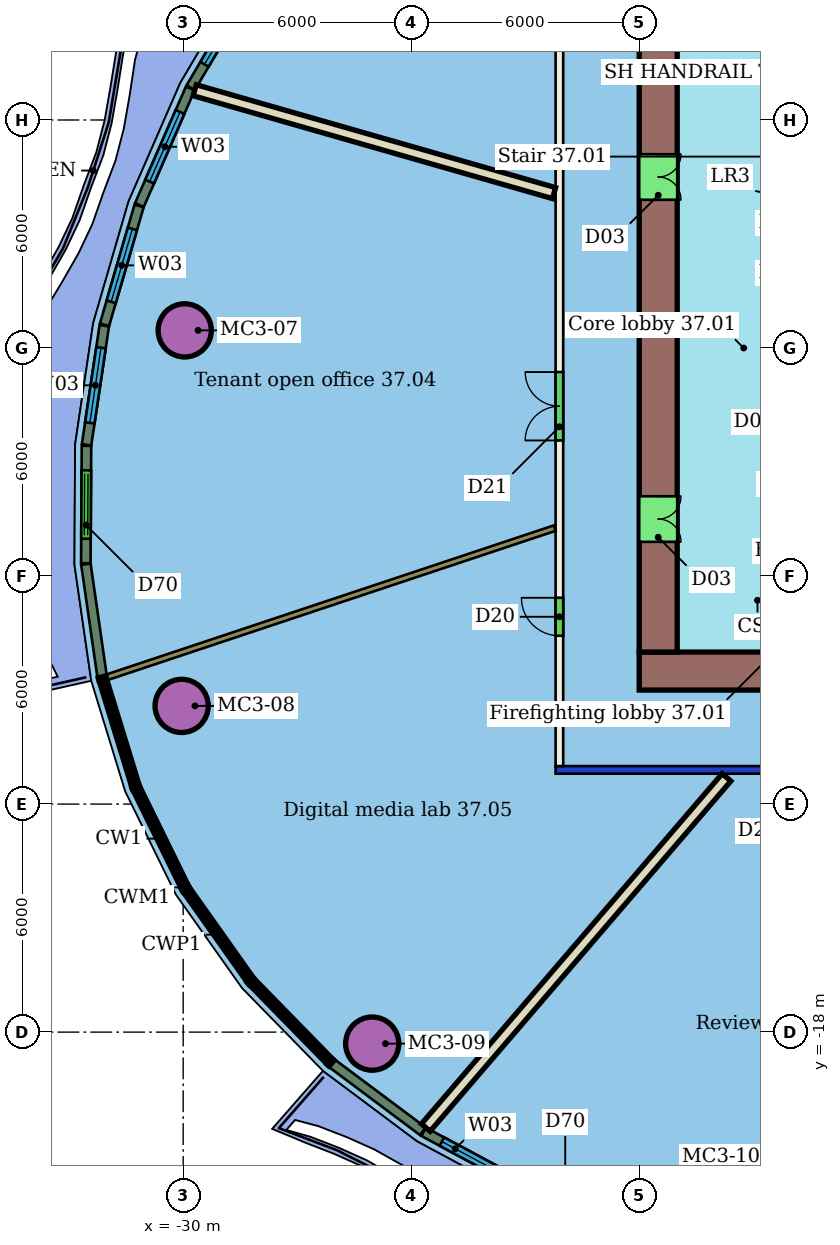
"""IFC4 building model, lengths in metres.
Left out: names, types, materials, properties, quantities, classifications, styles, units other than length and angle.
Written with IfcOpenShell. Run it as: python <this file> out.ifc"""

import sys

from ifc_helpers import new_model, si_unit, direction, frame, frame_2d, origin, origin_2d, place, context, subcontext, project, spatial, rectangle, hollow_circle, extrude, element, fill, save


model = new_model("IFC4")
c1 = context("Model", 3, precision=1e-05, world=origin(), true_north=direction((0.0, 1.0)))
c2 = subcontext(c1, "Body", "Model", "MODEL_VIEW")
j1 = project(units=[si_unit("LENGTHUNIT", "METRE"), si_unit("PLANEANGLEUNIT", "RADIAN")], contexts=[c1])
p1 = place(None, origin())
s1 = spatial("IfcSite", under=j1, at=p1, CompositionType="ELEMENT")
p2 = place(p1, origin())
s2 = spatial("IfcBuilding", under=s1, at=p2, CompositionType="ELEMENT")
p3 = place(p2, frame((0.0, 0.0, 157.8)))
s3 = spatial("IfcBuildingStorey", under=s2, at=p3, CompositionType="ELEMENT", Elevation=157.8)
for number, where, z_axis, x_axis in (
    (1, (-29.959, 0.464, 0.0), (0.0, 0.0, 1.0), (1.0, 0.0, 0.0)),
    (2, (-30.041, -9.417, 0.0), (0.0, 0.0, 1.0), (1.0, 0.0, 0.0)),
    (3, (-25.026, -18.303, 0.0), (0.0, 0.0, 1.0), (1.0, 0.0, 0.0)),
):
    element("IfcColumn", number, at=place(p3, frame(where, z_axis=z_axis, x_axis=x_axis)), inside=s3, PredefinedType="COLUMN", context=c2, shape_type="SweptSolid", body=[
        extrude(hollow_circle(Radius=0.7, WallThickness=0.05, at=origin_2d()), origin(), (0.0, 0.0, 1.0), 3.45),
    ])
p4 = place(p3, frame((8.2, -11.1, 0.0), z_axis=(0.0, 0.0, 1.0), x_axis=(-1.0, 0.0, 0.0)))
e4 = element("IfcWall", 4, at=p4, inside=s3, PredefinedType="PARTITIONING", context=c2, shape_type="SweptSolid", body=[
    extrude(rectangle(XDim=28.4, YDim=0.2, at=frame_2d((14.2, 0.0))), origin(), (0.0, 0.0, 1.0), 3.05),
])
p5 = place(p4, frame((19.745, 0.0, 0.0)))
e5 = element("IfcOpeningElement", 5, at=p5, cuts=e4, PredefinedType="OPENING", context=c2, shape_type="SweptSolid", body=[
    extrude(rectangle(XDim=1.8, YDim=2.4, at=frame_2d((0.9, 1.2))), frame((0.0, 0.11, 0.0), z_axis=(0.0, -1.0, 0.0), x_axis=(1.0, 0.0, 0.0)), (0.0, 0.0, 1.0), 0.22),
])
p6 = place(p4, frame((7.756, 0.0, 0.0)))
e6 = element("IfcOpeningElement", 6, at=p6, cuts=e4, PredefinedType="OPENING", context=c2, shape_type="SweptSolid", body=[
    extrude(rectangle(XDim=1.2, YDim=2.1, at=frame_2d((0.6, 1.05))), frame((0.0, 0.11, 0.0), z_axis=(0.0, -1.0, 0.0), x_axis=(1.0, 0.0, 0.0)), (0.0, 0.0, 1.0), 0.22),
])
p7 = place(p3, frame((-20.1, -11.0, 0.0), z_axis=(0.0, 0.0, 1.0), x_axis=(0.0, 1.0, 0.0)))
e7 = element("IfcWall", 7, at=p7, inside=s3, PredefinedType="PARTITIONING", context=c2, shape_type="SweptSolid", body=[
    extrude(rectangle(XDim=22.0, YDim=0.2, at=frame_2d((11.0, 0.0))), origin(), (0.0, 0.0, 1.0), 3.45),
])
p8 = place(p7, frame((8.568, 0.0, 0.0)))
e8 = element("IfcOpeningElement", 8, at=p8, cuts=e7, PredefinedType="OPENING", context=c2, shape_type="SweptSolid", body=[
    extrude(rectangle(XDim=1.8, YDim=2.1, at=frame_2d((0.9, 1.05))), frame((0.0, 0.11, 0.0), z_axis=(0.0, -1.0, 0.0), x_axis=(1.0, 0.0, 0.0)), (0.0, 0.0, 1.0), 0.22),
])
p9 = place(p7, frame((3.429, 0.0, 0.0)))
e9 = element("IfcOpeningElement", 9, at=p9, cuts=e7, PredefinedType="OPENING", context=c2, shape_type="SweptSolid", body=[
    extrude(rectangle(XDim=1.0, YDim=2.1, at=frame_2d((0.5, 1.05))), frame((0.0, 0.11, 0.0), z_axis=(0.0, -1.0, 0.0), x_axis=(1.0, 0.0, 0.0)), (0.0, 0.0, 1.0), 0.22),
])
p10 = place(p3, frame((-29.697, 6.783, 0.0), z_axis=(0.0, 0.0, 1.0), x_axis=(0.961388014147, -0.275196450295, 0.0)))
e10 = element("IfcWall", 10, at=p10, inside=s3, PredefinedType="PARTITIONING", context=c2, shape_type="SweptSolid", body=[
    extrude(rectangle(XDim=9.836, YDim=0.3, at=frame_2d((4.918, 0.0))), origin(), (0.0, 0.0, 1.0), 3.45),
])
p11 = place(p3, frame((-32.005, -8.663, 0.0), z_axis=(0.0, 0.0, 1.0), x_axis=(0.948742264592, 0.316050811384, 0.0)))
e11 = element("IfcWall", 11, at=p11, inside=s3, PredefinedType="PARTITIONING", context=c2, shape_type="SweptSolid", body=[
    extrude(rectangle(XDim=12.417, YDim=0.15, at=frame_2d((6.209, 0.0))), origin(), (0.0, 0.0, 1.0), 3.45),
])
p12 = place(p3, frame((-23.616, -20.511, 0.0), z_axis=(0.0, 0.0, 1.0), x_axis=(0.65154594092, 0.758609179268, 0.0)))
e12 = element("IfcWall", 12, at=p12, inside=s3, PredefinedType="PARTITIONING", context=c2, shape_type="SweptSolid", body=[
    extrude(rectangle(XDim=12.145, YDim=0.3, at=frame_2d((6.073, 0.0))), origin(), (0.0, 0.0, 1.0), 3.45),
])
p13 = place(p3, frame((-28.057, 9.804, 0.0), z_axis=(0.0, 0.0, 1.0), x_axis=(-0.508707735762, -0.860939277519, 0.0)))
e13 = element("IfcWall", 13, at=p13, inside=s3, PredefinedType="SOLIDWALL", context=c2, shape_type="SweptSolid", body=[
    extrude(rectangle(XDim=3.431, YDim=0.25, at=frame_2d((1.715, 0.0))), origin(), (0.0, 0.0, 1.0), 3.1),
])
p14 = place(p13, frame((0.716, 0.0, 0.9)))
e14 = element("IfcOpeningElement", 14, at=p14, cuts=e13, PredefinedType="OPENING", context=c2, shape_type="SweptSolid", body=[
    extrude(rectangle(XDim=2.0, YDim=2.1, at=frame_2d((1.0, 1.05))), frame((0.0, 0.135, 0.0), z_axis=(0.0, -1.0, 0.0), x_axis=(1.0, 0.0, 0.0)), (0.0, 0.0, 1.0), 0.27),
])
p15 = place(p3, frame((-29.813, 6.83, 0.0), z_axis=(0.0, 0.0, 1.0), x_axis=(-0.399984559648, -0.916521877559, 0.0)))
e15 = element("IfcWall", 15, at=p15, inside=s3, PredefinedType="SOLIDWALL", context=c2, shape_type="SweptSolid", body=[
    extrude(rectangle(XDim=3.347, YDim=0.25, at=frame_2d((1.674, 0.0))), origin(), (0.0, 0.0, 1.0), 3.1),
])
p16 = place(p15, frame((0.674, 0.0, 0.9)))
e16 = element("IfcOpeningElement", 16, at=p16, cuts=e15, PredefinedType="OPENING", context=c2, shape_type="SweptSolid", body=[
    extrude(rectangle(XDim=2.0, YDim=2.1, at=frame_2d((1.0, 1.05))), frame((0.0, 0.135, 0.0), z_axis=(0.0, -1.0, 0.0), x_axis=(1.0, 0.0, 0.0)), (0.0, 0.0, 1.0), 0.27),
])
p17 = place(p3, frame((-31.16, 3.739, 0.0), z_axis=(0.0, 0.0, 1.0), x_axis=(-0.279349638575, -0.960189449759, 0.0)))
e17 = element("IfcWall", 17, at=p17, inside=s3, PredefinedType="SOLIDWALL", context=c2, shape_type="SweptSolid", body=[
    extrude(rectangle(XDim=3.258, YDim=0.25, at=frame_2d((1.629, 0.0))), origin(), (0.0, 0.0, 1.0), 3.1),
])
p18 = place(p17, frame((0.629, 0.0, 0.9)))
e18 = element("IfcOpeningElement", 18, at=p18, cuts=e17, PredefinedType="OPENING", context=c2, shape_type="SweptSolid", body=[
    extrude(rectangle(XDim=2.0, YDim=2.1, at=frame_2d((1.0, 1.05))), frame((0.0, 0.135, 0.0), z_axis=(0.0, -1.0, 0.0), x_axis=(1.0, 0.0, 0.0)), (0.0, 0.0, 1.0), 0.27),
])
p19 = place(p3, frame((-32.076, 0.586, 0.0), z_axis=(0.0, 0.0, 1.0), x_axis=(-0.147361008263, -0.989082773707, 0.0)))
e19 = element("IfcWall", 19, at=p19, inside=s3, PredefinedType="SOLIDWALL", context=c2, shape_type="SweptSolid", body=[
    extrude(rectangle(XDim=3.169, YDim=0.25, at=frame_2d((1.585, 0.0))), origin(), (0.0, 0.0, 1.0), 3.1),
])
p20 = place(p19, frame((0.585, 0.0, 0.9)))
e20 = element("IfcOpeningElement", 20, at=p20, cuts=e19, PredefinedType="OPENING", context=c2, shape_type="SweptSolid", body=[
    extrude(rectangle(XDim=2.0, YDim=2.1, at=frame_2d((1.0, 1.05))), frame((0.0, 0.135, 0.0), z_axis=(0.0, -1.0, 0.0), x_axis=(1.0, 0.0, 0.0)), (0.0, 0.0, 1.0), 0.27),
])
p21 = place(p3, frame((-32.545, -2.574, 0.0), z_axis=(0.0, 0.0, 1.0), x_axis=(-0.005534387094, -0.999984685162, 0.0)))
e21 = element("IfcWall", 21, at=p21, inside=s3, PredefinedType="SOLIDWALL", context=c2, shape_type="SweptSolid", body=[
    extrude(rectangle(XDim=3.088, YDim=0.25, at=frame_2d((1.544, 0.0))), origin(), (0.0, 0.0, 1.0), 3.1),
])
p22 = place(p21, frame((0.644, 0.0, 0.0)))
e22 = element("IfcOpeningElement", 22, at=p22, cuts=e21, PredefinedType="OPENING", context=c2, shape_type="SweptSolid", body=[
    extrude(rectangle(XDim=1.8, YDim=2.4, at=frame_2d((0.9, 1.2))), frame((0.0, 0.135, 0.0), z_axis=(0.0, -1.0, 0.0), x_axis=(1.0, 0.0, 0.0)), (0.0, 0.0, 1.0), 0.27),
])
p23 = place(p3, frame((-32.56, -5.688, 0.0), z_axis=(0.0, 0.0, 1.0), x_axis=(0.142970577469, -0.989726939099, 0.0)))
e23 = element("IfcWall", 23, at=p23, inside=s3, PredefinedType="SOLIDWALL", context=c2, shape_type="SweptSolid", body=[
    extrude(rectangle(XDim=2.978, YDim=0.25, at=frame_2d((1.489, 0.0))), origin(), (0.0, 0.0, 1.0), 3.1),
])
p24 = place(p3, frame((-26.08, -18.826, 0.0), z_axis=(0.0, 0.0, 1.0), x_axis=(0.800953148143, -0.598727028353, 0.0)))
e24 = element("IfcWall", 24, at=p24, inside=s3, PredefinedType="SOLIDWALL", context=c2, shape_type="SweptSolid", body=[
    extrude(rectangle(XDim=2.978, YDim=0.25, at=frame_2d((1.489, 0.0))), origin(), (0.0, 0.0, 1.0), 3.1),
])
p25 = place(p3, frame((-23.672, -20.623, 0.0), z_axis=(0.0, 0.0, 1.0), x_axis=(0.880950483719, -0.473208458541, 0.0)))
e25 = element("IfcWall", 25, at=p25, inside=s3, PredefinedType="SOLIDWALL", context=c2, shape_type="SweptSolid", body=[
    extrude(rectangle(XDim=3.088, YDim=0.25, at=frame_2d((1.544, 0.0))), origin(), (0.0, 0.0, 1.0), 3.1),
])
p26 = place(p25, frame((0.544, 0.0, 0.9)))
e26 = element("IfcOpeningElement", 26, at=p26, cuts=e25, PredefinedType="OPENING", context=c2, shape_type="SweptSolid", body=[
    extrude(rectangle(XDim=2.0, YDim=2.1, at=frame_2d((1.0, 1.05))), frame((0.0, 0.135, 0.0), z_axis=(0.0, -1.0, 0.0), x_axis=(1.0, 0.0, 0.0)), (0.0, 0.0, 1.0), 0.27),
])
p27 = place(p3, frame((-18.0, -8.5, 0.0), z_axis=(0.0, 0.0, 1.0), x_axis=(1.0, 0.0, 0.0)))
e27 = element("IfcWall", 27, at=p27, inside=s3, PredefinedType="SHEAR", context=c2, shape_type="SweptSolid", body=[
    extrude(rectangle(XDim=24.0, YDim=1.0, at=frame_2d((12.0, 0.0))), origin(), (0.0, 0.0, 1.0), 3.3),
])
p28 = place(p27, frame((6.0, 0.0, 0.0)))
e28 = element("IfcOpeningElement", 28, at=p28, cuts=e27, PredefinedType="OPENING", context=c2, shape_type="SweptSolid", body=[
    extrude(rectangle(XDim=1.2, YDim=2.1, at=frame_2d((0.6, 1.05))), frame((0.0, 0.51, 0.0), z_axis=(0.0, -1.0, 0.0), x_axis=(1.0, 0.0, 0.0)), (0.0, 0.0, 1.0), 1.02),
])
p29 = place(p3, frame((-17.5, 8.0, 0.0), z_axis=(0.0, 0.0, 1.0), x_axis=(0.0, -1.0, 0.0)))
e29 = element("IfcWall", 29, at=p29, inside=s3, PredefinedType="SHEAR", context=c2, shape_type="SweptSolid", body=[
    extrude(rectangle(XDim=16.0, YDim=1.0, at=frame_2d((8.0, 0.0))), origin(), (0.0, 0.0, 1.0), 3.3),
])
p30 = place(p29, frame((11.9, 0.0, 0.0)))
e30 = element("IfcOpeningElement", 30, at=p30, cuts=e29, PredefinedType="OPENING", context=c2, shape_type="SweptSolid", body=[
    extrude(rectangle(XDim=1.2, YDim=2.1, at=frame_2d((0.6, 1.05))), frame((0.0, 0.51, 0.0), z_axis=(0.0, -1.0, 0.0), x_axis=(1.0, 0.0, 0.0)), (0.0, 0.0, 1.0), 1.02),
])
p31 = place(p29, frame((2.9, 0.0, 0.0)))
e31 = element("IfcOpeningElement", 31, at=p31, cuts=e29, PredefinedType="OPENING", context=c2, shape_type="SweptSolid", body=[
    extrude(rectangle(XDim=1.2, YDim=2.1, at=frame_2d((0.6, 1.05))), frame((0.0, 0.51, 0.0), z_axis=(0.0, -1.0, 0.0), x_axis=(1.0, 0.0, 0.0)), (0.0, 0.0, 1.0), 1.02),
])
p32 = place(p8, origin())
e32 = element("IfcDoor", 32, at=p32, inside=s3, OperationType="DOUBLE_DOOR_SINGLE_SWING", PredefinedType="DOOR", context=c2, shape_type="SweptSolid", body=[
    extrude(rectangle(XDim=1.8, YDim=2.1, at=frame_2d((0.9, 1.05))), frame((0.0, 0.025, 0.0), z_axis=(0.0, -1.0, 0.0), x_axis=(1.0, 0.0, 0.0)), (0.0, 0.0, 1.0), 0.05),
])
fill(e8, e32)
p33 = place(p9, origin())
e33 = element("IfcDoor", 33, at=p33, inside=s3, OperationType="SINGLE_SWING_RIGHT", PredefinedType="DOOR", context=c2, shape_type="SweptSolid", body=[
    extrude(rectangle(XDim=1.0, YDim=2.1, at=frame_2d((0.5, 1.05))), frame((0.0, 0.025, 0.0), z_axis=(0.0, -1.0, 0.0), x_axis=(1.0, 0.0, 0.0)), (0.0, 0.0, 1.0), 0.05),
])
fill(e9, e33)
p34 = place(p14, origin())
e34 = element("IfcWindow", 34, at=p34, inside=s3, PartitioningType="SINGLE_PANEL", PredefinedType="WINDOW", context=c2, shape_type="SweptSolid", body=[
    extrude(rectangle(XDim=2.0, YDim=2.1, at=frame_2d((1.0, 1.05))), frame((0.0, 0.03, 0.0), z_axis=(0.0, -1.0, 0.0), x_axis=(1.0, 0.0, 0.0)), (0.0, 0.0, 1.0), 0.06),
])
fill(e14, e34)
p35 = place(p16, origin())
e35 = element("IfcWindow", 35, at=p35, inside=s3, PartitioningType="SINGLE_PANEL", PredefinedType="WINDOW", context=c2, shape_type="SweptSolid", body=[
    extrude(rectangle(XDim=2.0, YDim=2.1, at=frame_2d((1.0, 1.05))), frame((0.0, 0.03, 0.0), z_axis=(0.0, -1.0, 0.0), x_axis=(1.0, 0.0, 0.0)), (0.0, 0.0, 1.0), 0.06),
])
fill(e16, e35)
p36 = place(p18, origin())
e36 = element("IfcWindow", 36, at=p36, inside=s3, PartitioningType="SINGLE_PANEL", PredefinedType="WINDOW", context=c2, shape_type="SweptSolid", body=[
    extrude(rectangle(XDim=2.0, YDim=2.1, at=frame_2d((1.0, 1.05))), frame((0.0, 0.03, 0.0), z_axis=(0.0, -1.0, 0.0), x_axis=(1.0, 0.0, 0.0)), (0.0, 0.0, 1.0), 0.06),
])
fill(e18, e36)
p37 = place(p20, origin())
e37 = element("IfcWindow", 37, at=p37, inside=s3, PartitioningType="SINGLE_PANEL", PredefinedType="WINDOW", context=c2, shape_type="SweptSolid", body=[
    extrude(rectangle(XDim=2.0, YDim=2.1, at=frame_2d((1.0, 1.05))), frame((0.0, 0.03, 0.0), z_axis=(0.0, -1.0, 0.0), x_axis=(1.0, 0.0, 0.0)), (0.0, 0.0, 1.0), 0.06),
])
fill(e20, e37)
p38 = place(p22, origin())
e38 = element("IfcDoor", 38, at=p38, inside=s3, OperationType="DOUBLE_DOOR_SLIDING", PredefinedType="DOOR", context=c2, shape_type="SweptSolid", body=[
    extrude(rectangle(XDim=1.8, YDim=2.4, at=frame_2d((0.9, 1.2))), frame((0.0, 0.025, 0.0), z_axis=(0.0, -1.0, 0.0), x_axis=(1.0, 0.0, 0.0)), (0.0, 0.0, 1.0), 0.05),
])
fill(e22, e38)
p39 = place(p26, origin())
e39 = element("IfcWindow", 39, at=p39, inside=s3, PartitioningType="SINGLE_PANEL", PredefinedType="WINDOW", context=c2, shape_type="SweptSolid", body=[
    extrude(rectangle(XDim=2.0, YDim=2.1, at=frame_2d((1.0, 1.05))), frame((0.0, 0.03, 0.0), z_axis=(0.0, -1.0, 0.0), x_axis=(1.0, 0.0, 0.0)), (0.0, 0.0, 1.0), 0.06),
])
fill(e26, e39)
p40 = place(p30, origin())
e40 = element("IfcDoor", 40, at=p40, inside=s3, OperationType="DOUBLE_DOOR_SINGLE_SWING", PredefinedType="NOTDEFINED", context=c2, shape_type="SweptSolid", body=[
    extrude(rectangle(XDim=1.2, YDim=2.1, at=frame_2d((0.6, 1.05))), frame((0.0, 0.025, 0.0), z_axis=(0.0, -1.0, 0.0), x_axis=(1.0, 0.0, 0.0)), (0.0, 0.0, 1.0), 0.05),
])
fill(e30, e40)
p41 = place(p31, origin())
e41 = element("IfcDoor", 41, at=p41, inside=s3, OperationType="DOUBLE_DOOR_SINGLE_SWING", PredefinedType="NOTDEFINED", context=c2, shape_type="SweptSolid", body=[
    extrude(rectangle(XDim=1.2, YDim=2.1, at=frame_2d((0.6, 1.05))), frame((0.0, 0.025, 0.0), z_axis=(0.0, -1.0, 0.0), x_axis=(1.0, 0.0, 0.0)), (0.0, 0.0, 1.0), 0.05),
])
fill(e31, e41)
save(model, sys.argv[1])
